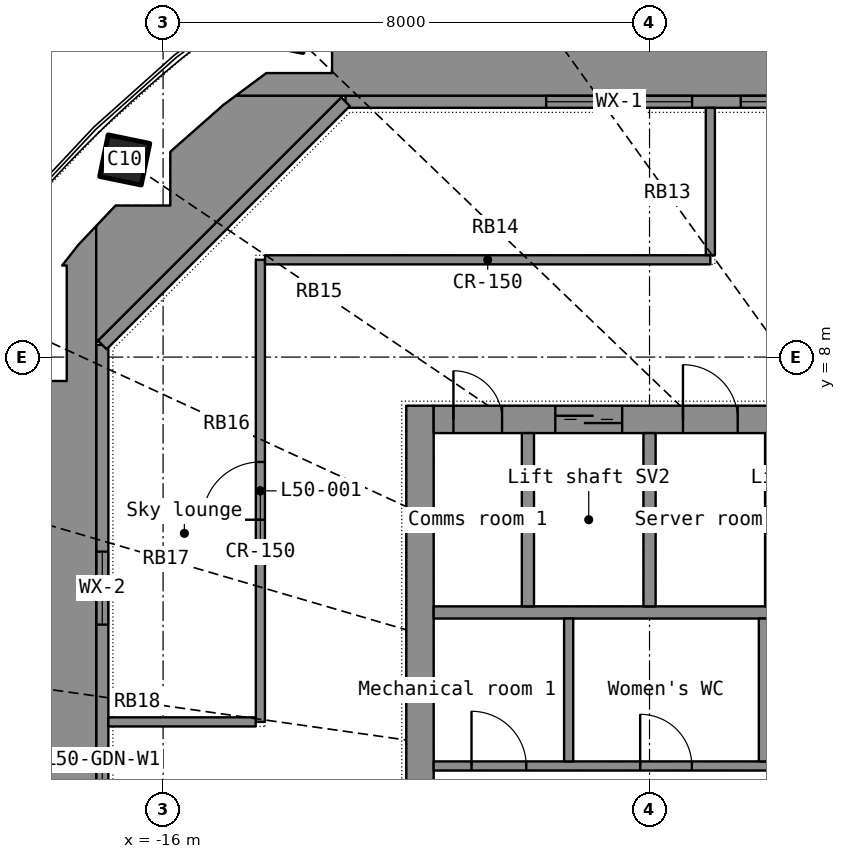
"""IFC4 building model, lengths in metres.
Left out: names, types, materials, properties, quantities, classifications, styles, units other than length and angle.
Written with IfcOpenShell. Run it as: python <this file> out.ifc"""

import sys

from ifc_helpers import new_model, si_unit, direction, frame, frame_2d, origin, origin_2d, place, context, subcontext, project, spatial, polyline, rectangle, hollow_rectangle, outline, extrude, element, fill, save


model = new_model("IFC4")
c1 = context("Model", 3, precision=1e-05, world=origin(), true_north=direction((0.0, 1.0)))
c2 = subcontext(c1, "Body", "Model", "MODEL_VIEW")
j1 = project(units=[si_unit("LENGTHUNIT", "METRE"), si_unit("PLANEANGLEUNIT", "RADIAN")], contexts=[c1])
p1 = place(None, origin())
s1 = spatial("IfcSite", under=j1, at=p1, CompositionType="ELEMENT")
p2 = place(p1, origin())
s2 = spatial("IfcBuilding", under=s1, at=p2, CompositionType="ELEMENT")
p3 = place(p2, frame((0.0, 0.0, 205.2)))
s3 = spatial("IfcBuildingStorey", under=s2, at=p3, CompositionType="ELEMENT", Elevation=205.2)
p4 = place(p3, frame((-13.971, 13.421, 0.0), z_axis=(0.022258382, -0.021697801, 0.999516768), x_axis=(0.828160065, 0.560456529, -0.006275862)))
e1 = element("IfcColumn", 1, at=p4, inside=s3, PredefinedType="COLUMN", context=c2, shape_type="SweptSolid", body=[
    extrude(hollow_rectangle(XDim=0.7, YDim=0.7, WallThickness=0.025, at=origin_2d()), origin(), (0.0, 0.0, 1.0), 7.404),
])
p5 = place(p3, frame((-16.631, 11.243, 0.0), z_axis=(0.026511305, -0.018201791, 0.999482789), x_axis=(0.720516136, 0.693407857, -0.006483911)))
e2 = element("IfcColumn", 2, at=p5, inside=s3, PredefinedType="COLUMN", context=c2, shape_type="SweptSolid", body=[
    extrude(hollow_rectangle(XDim=0.7, YDim=0.7, WallThickness=0.025, at=origin_2d()), origin(), (0.0, 0.0, 1.0), 7.404),
])
p6 = place(p3, frame((-18.535, 8.557, 0.0), z_axis=(0.029972624, -0.014178469, 0.999450155), x_axis=(0.583640912, 0.811989828, -0.005983767)))
e3 = element("IfcColumn", 3, at=p6, inside=s3, PredefinedType="COLUMN", context=c2, shape_type="SweptSolid", body=[
    extrude(hollow_rectangle(XDim=1.1, YDim=1.1, WallThickness=0.032, at=origin_2d()), origin(), (0.0, 0.0, 1.0), 7.404),
])
p7 = place(p3, frame((-13.0, 12.2, 0.08), z_axis=(0.0, 0.0, 1.0), x_axis=(1.0, 0.0, 0.0)))
e4 = element("IfcWall", 4, at=p7, inside=s3, PredefinedType="STANDARD", context=c2, shape_type="SweptSolid", body=[
    extrude(rectangle(XDim=26.0, YDim=0.2, at=frame_2d((13.0, 0.0))), origin(), (0.0, 0.0, 1.0), 7.12),
])
p8 = place(p7, frame((7.1, 0.0, 0.0)))
e5 = element("IfcOpeningElement", 5, at=p8, cuts=e4, PredefinedType="OPENING", context=c2, shape_type="SweptSolid", body=[
    extrude(rectangle(XDim=1.8, YDim=2.4, at=frame_2d((0.9, 1.2))), frame((0.0, 0.11, 0.0), z_axis=(0.0, -1.0, 0.0), x_axis=(1.0, 0.0, 0.0)), (0.0, 0.0, 1.0), 0.22),
])
p9 = place(p7, frame((17.1, 0.0, 0.0)))
e6 = element("IfcOpeningElement", 6, at=p9, cuts=e4, PredefinedType="OPENING", context=c2, shape_type="SweptSolid", body=[
    extrude(rectangle(XDim=1.8, YDim=2.4, at=frame_2d((0.9, 1.2))), frame((0.0, 0.11, 0.0), z_axis=(0.0, -1.0, 0.0), x_axis=(1.0, 0.0, 0.0)), (0.0, 0.0, 1.0), 0.22),
])
p10 = place(p7, frame((3.3, 0.0, 0.9)))
e7 = element("IfcOpeningElement", 7, at=p10, cuts=e4, PredefinedType="OPENING", context=c2, shape_type="SweptSolid", body=[
    extrude(rectangle(XDim=2.4, YDim=1.5, at=frame_2d((1.2, 0.75))), frame((0.0, 0.11, 0.0), z_axis=(0.0, -1.0, 0.0), x_axis=(1.0, 0.0, 0.0)), (0.0, 0.0, 1.0), 0.22),
])
p11 = place(p7, frame((11.8, 0.0, 0.9)))
e8 = element("IfcOpeningElement", 8, at=p11, cuts=e4, PredefinedType="OPENING", context=c2, shape_type="SweptSolid", body=[
    extrude(rectangle(XDim=2.4, YDim=1.5, at=frame_2d((1.2, 0.75))), frame((0.0, 0.11, 0.0), z_axis=(0.0, -1.0, 0.0), x_axis=(1.0, 0.0, 0.0)), (0.0, 0.0, 1.0), 0.22),
])
p12 = place(p7, frame((20.3, 0.0, 0.9)))
e9 = element("IfcOpeningElement", 9, at=p12, cuts=e4, PredefinedType="OPENING", context=c2, shape_type="SweptSolid", body=[
    extrude(rectangle(XDim=2.4, YDim=1.5, at=frame_2d((1.2, 0.75))), frame((0.0, 0.11, 0.0), z_axis=(0.0, -1.0, 0.0), x_axis=(1.0, 0.0, 0.0)), (0.0, 0.0, 1.0), 0.22),
])
p13 = place(p7, frame((6.5, 0.0, 3.2)))
e10 = element("IfcOpeningElement", 10, at=p13, cuts=e4, PredefinedType="OPENING", context=c2, shape_type="SweptSolid", body=[
    extrude(rectangle(XDim=3.0, YDim=1.0, at=frame_2d((1.5, 0.5))), frame((0.0, 0.11, 0.0), z_axis=(0.0, -1.0, 0.0), x_axis=(1.0, 0.0, 0.0)), (0.0, 0.0, 1.0), 0.22),
])
p14 = place(p7, frame((16.5, 0.0, 3.2)))
e11 = element("IfcOpeningElement", 11, at=p14, cuts=e4, PredefinedType="OPENING", context=c2, shape_type="SweptSolid", body=[
    extrude(rectangle(XDim=3.0, YDim=1.0, at=frame_2d((1.5, 0.5))), frame((0.0, 0.11, 0.0), z_axis=(0.0, -1.0, 0.0), x_axis=(1.0, 0.0, 0.0)), (0.0, 0.0, 1.0), 0.22),
])
p15 = place(p3, frame((-17.0, -8.2, 0.08), z_axis=(0.0, 0.0, 1.0), x_axis=(0.0, 1.0, 0.0)))
e12 = element("IfcWall", 12, at=p15, inside=s3, PredefinedType="STANDARD", context=c2, shape_type="SweptSolid", body=[
    extrude(rectangle(XDim=16.4, YDim=0.2, at=frame_2d((8.2, 0.0))), origin(), (0.0, 0.0, 1.0), 7.12),
])
p16 = place(p15, frame((7.3, 0.0, 0.0)))
e13 = element("IfcOpeningElement", 13, at=p16, cuts=e12, PredefinedType="OPENING", context=c2, shape_type="SweptSolid", body=[
    extrude(rectangle(XDim=1.8, YDim=2.4, at=frame_2d((0.9, 1.2))), frame((0.0, 0.11, 0.0), z_axis=(0.0, -1.0, 0.0), x_axis=(1.0, 0.0, 0.0)), (0.0, 0.0, 1.0), 0.22),
])
p17 = place(p15, frame((3.4, 0.0, 0.1)))
e14 = element("IfcOpeningElement", 14, at=p17, cuts=e12, PredefinedType="OPENING", context=c2, shape_type="SweptSolid", body=[
    extrude(rectangle(XDim=1.2, YDim=2.2, at=frame_2d((0.6, 1.1))), frame((0.0, 0.11, 0.0), z_axis=(0.0, -1.0, 0.0), x_axis=(1.0, 0.0, 0.0)), (0.0, 0.0, 1.0), 0.22),
])
p18 = place(p15, frame((11.8, 0.0, 0.1)))
e15 = element("IfcOpeningElement", 15, at=p18, cuts=e12, PredefinedType="OPENING", context=c2, shape_type="SweptSolid", body=[
    extrude(rectangle(XDim=1.2, YDim=2.2, at=frame_2d((0.6, 1.1))), frame((0.0, 0.11, 0.0), z_axis=(0.0, -1.0, 0.0), x_axis=(1.0, 0.0, 0.0)), (0.0, 0.0, 1.0), 0.22),
])
p19 = place(p3, frame((-17.0, 8.2, 0.08), z_axis=(0.0, 0.0, 1.0), x_axis=(0.707106781, 0.707106781, 0.0)))
e16 = element("IfcWall", 16, at=p19, inside=s3, PredefinedType="STANDARD", context=c2, shape_type="SweptSolid", body=[
    extrude(rectangle(XDim=5.657, YDim=0.2, at=frame_2d((2.828, 0.0))), origin(), (0.0, 0.0, 1.0), 7.12),
])
p20 = place(p3, frame((0.0, 0.0, -0.4)))
e17 = element("IfcWall", 17, at=p20, inside=s3, PredefinedType="ELEMENTEDWALL", context=c2, shape_type="SweptSolid", body=[
    extrude(outline(polyline([(-21.019, 2.273), (-21.145, 1.497), (-21.175, 0.95), (-20.39, 0.95), (-20.39, 0.9), (-17.1, 0.9), (-17.1, 8.241), (-17.1, 10.156), (-17.387, 9.853), (-17.66, 9.507), (-17.585, 9.507), (-17.585, 7.607), (-19.014, 7.607), (-19.237, 7.26), (-19.606, 6.54), (-19.606, 5.212), (-20.205, 5.212), (-20.503, 4.446), (-20.687, 3.773), (-20.567, 3.773), (-20.567, 2.273), (-21.019, 2.273)])), origin(), (0.0, 0.0, 1.0), 1.58),
])
p21 = place(p3, frame((0.0, 0.0, -0.4)))
e18 = element("IfcWall", 18, at=p21, inside=s3, PredefinedType="ELEMENTEDWALL", context=c2, shape_type="SweptSolid", body=[
    extrude(outline(polyline([(-17.1, 10.156), (-17.1, 8.241), (-13.042, 12.3), (-14.803, 12.3), (-15.009, 12.147), (-15.881, 11.377), (-15.881, 10.493), (-16.781, 10.493), (-17.1, 10.156)])), origin(), (0.0, 0.0, 1.0), 1.58),
])
p22 = place(p3, frame((0.0, 0.0, -0.4)))
e19 = element("IfcWall", 19, at=p22, inside=s3, PredefinedType="ELEMENTEDWALL", context=c2, shape_type="SweptSolid", body=[
    extrude(outline(polyline([(-14.803, 12.3), (-13.042, 12.3), (-5.9, 12.3), (-5.9, 16.49), (-6.696, 16.286), (-6.696, 15.756), (-8.196, 15.756), (-8.196, 15.829), (-8.97, 15.569), (-9.8, 15.22), (-9.8, 13.974), (-11.7, 13.974), (-11.7, 14.317), (-12.175, 14.072), (-13.221, 13.422), (-13.221, 12.671), (-14.302, 12.671), (-14.803, 12.3)])), origin(), (0.0, 0.0, 1.0), 1.58),
])
p23 = place(p3, frame((-11.775, -7.2, 0.0), z_axis=(0.0, 0.0, 1.0), x_axis=(0.0, 1.0, 0.0)))
e20 = element("IfcWall", 20, at=p23, inside=s3, PredefinedType="SHEAR", context=c2, shape_type="SweptSolid", body=[
    extrude(rectangle(XDim=14.4, YDim=0.45, at=frame_2d((7.2, 0.0))), origin(), (0.0, 0.0, 1.0), 7.0),
])
p24 = place(p23, frame((6.5, 0.0, 0.0)))
e21 = element("IfcOpeningElement", 21, at=p24, cuts=e20, PredefinedType="OPENING", context=c2, shape_type="SweptSolid", body=[
    extrude(rectangle(XDim=1.4, YDim=2.2, at=frame_2d((0.7, 1.1))), frame((0.0, 0.235, 0.0), z_axis=(0.0, -1.0, 0.0), x_axis=(1.0, 0.0, 0.0)), (0.0, 0.0, 1.0), 0.47),
])
p25 = place(p3, frame((-11.55, 6.975, 0.0), z_axis=(0.0, 0.0, 1.0), x_axis=(1.0, 0.0, 0.0)))
e22 = element("IfcWall", 22, at=p25, inside=s3, PredefinedType="SHEAR", context=c2, shape_type="SweptSolid", body=[
    extrude(rectangle(XDim=23.1, YDim=0.45, at=frame_2d((11.55, 0.0))), origin(), (0.0, 0.0, 1.0), 7.0),
])
p26 = place(p25, frame((2.0, 0.0, 0.0)))
e23 = element("IfcOpeningElement", 23, at=p26, cuts=e22, PredefinedType="OPENING", context=c2, shape_type="SweptSolid", body=[
    extrude(rectangle(XDim=1.1, YDim=2.2, at=frame_2d((0.55, 1.1))), frame((0.0, 0.235, 0.0), z_axis=(0.0, -1.0, 0.0), x_axis=(1.0, 0.0, 0.0)), (0.0, 0.0, 1.0), 0.47),
])
p27 = place(p25, frame((6.0, 0.0, 0.0)))
e24 = element("IfcOpeningElement", 24, at=p27, cuts=e22, PredefinedType="OPENING", context=c2, shape_type="SweptSolid", body=[
    extrude(rectangle(XDim=1.1, YDim=2.2, at=frame_2d((0.55, 1.1))), frame((0.0, 0.235, 0.0), z_axis=(0.0, -1.0, 0.0), x_axis=(1.0, 0.0, 0.0)), (0.0, 0.0, 1.0), 0.47),
])
p28 = place(p25, frame((8.0, 0.0, 0.0)))
e25 = element("IfcOpeningElement", 25, at=p28, cuts=e22, PredefinedType="OPENING", context=c2, shape_type="SweptSolid", body=[
    extrude(rectangle(XDim=1.1, YDim=2.2, at=frame_2d((0.55, 1.1))), frame((0.0, 0.235, 0.0), z_axis=(0.0, -1.0, 0.0), x_axis=(1.0, 0.0, 0.0)), (0.0, 0.0, 1.0), 0.47),
])
p29 = place(p25, frame((10.0, 0.0, 0.0)))
e26 = element("IfcOpeningElement", 26, at=p29, cuts=e22, PredefinedType="OPENING", context=c2, shape_type="SweptSolid", body=[
    extrude(rectangle(XDim=1.1, YDim=2.2, at=frame_2d((0.55, 1.1))), frame((0.0, 0.235, 0.0), z_axis=(0.0, -1.0, 0.0), x_axis=(1.0, 0.0, 0.0)), (0.0, 0.0, 1.0), 0.47),
])
p30 = place(p25, frame((12.0, 0.0, 0.0)))
e27 = element("IfcOpeningElement", 27, at=p30, cuts=e22, PredefinedType="OPENING", context=c2, shape_type="SweptSolid", body=[
    extrude(rectangle(XDim=1.1, YDim=2.2, at=frame_2d((0.55, 1.1))), frame((0.0, 0.235, 0.0), z_axis=(0.0, -1.0, 0.0), x_axis=(1.0, 0.0, 0.0)), (0.0, 0.0, 1.0), 0.47),
])
p31 = place(p25, frame((14.0, 0.0, 0.0)))
e28 = element("IfcOpeningElement", 28, at=p31, cuts=e22, PredefinedType="OPENING", context=c2, shape_type="SweptSolid", body=[
    extrude(rectangle(XDim=1.1, YDim=2.2, at=frame_2d((0.55, 1.1))), frame((0.0, 0.235, 0.0), z_axis=(0.0, -1.0, 0.0), x_axis=(1.0, 0.0, 0.0)), (0.0, 0.0, 1.0), 0.47),
])
p32 = place(p25, frame((16.0, 0.0, 0.0)))
e29 = element("IfcOpeningElement", 29, at=p32, cuts=e22, PredefinedType="OPENING", context=c2, shape_type="SweptSolid", body=[
    extrude(rectangle(XDim=1.1, YDim=2.2, at=frame_2d((0.55, 1.1))), frame((0.0, 0.235, 0.0), z_axis=(0.0, -1.0, 0.0), x_axis=(1.0, 0.0, 0.0)), (0.0, 0.0, 1.0), 0.47),
])
p33 = place(p25, frame((18.0, 0.0, 0.0)))
e30 = element("IfcOpeningElement", 30, at=p33, cuts=e22, PredefinedType="OPENING", context=c2, shape_type="SweptSolid", body=[
    extrude(rectangle(XDim=1.1, YDim=2.2, at=frame_2d((0.55, 1.1))), frame((0.0, 0.235, 0.0), z_axis=(0.0, -1.0, 0.0), x_axis=(1.0, 0.0, 0.0)), (0.0, 0.0, 1.0), 0.47),
])
p34 = place(p25, frame((20.0, 0.0, 0.0)))
e31 = element("IfcOpeningElement", 31, at=p34, cuts=e22, PredefinedType="OPENING", context=c2, shape_type="SweptSolid", body=[
    extrude(rectangle(XDim=1.1, YDim=2.2, at=frame_2d((0.55, 1.1))), frame((0.0, 0.235, 0.0), z_axis=(0.0, -1.0, 0.0), x_axis=(1.0, 0.0, 0.0)), (0.0, 0.0, 1.0), 0.47),
])
p35 = place(p25, frame((4.1, 0.0, 0.0)))
e32 = element("IfcOpeningElement", 32, at=p35, cuts=e22, PredefinedType="OPENING", context=c2, shape_type="SweptSolid", body=[
    extrude(rectangle(XDim=0.9, YDim=2.1, at=frame_2d((0.45, 1.05))), frame((0.0, 0.235, 0.0), z_axis=(0.0, -1.0, 0.0), x_axis=(1.0, 0.0, 0.0)), (0.0, 0.0, 1.0), 0.47),
])
p36 = place(p25, frame((0.325, 0.0, 0.0)))
e33 = element("IfcOpeningElement", 33, at=p36, cuts=e22, PredefinedType="OPENING", context=c2, shape_type="SweptSolid", body=[
    extrude(rectangle(XDim=0.8, YDim=2.05, at=frame_2d((0.4, 1.025))), frame((0.0, 0.235, 0.0), z_axis=(0.0, -1.0, 0.0), x_axis=(1.0, 0.0, 0.0)), (0.0, 0.0, 1.0), 0.47),
])
p37 = place(p25, frame((21.975, 0.0, 0.0)))
e34 = element("IfcOpeningElement", 34, at=p37, cuts=e22, PredefinedType="OPENING", context=c2, shape_type="SweptSolid", body=[
    extrude(rectangle(XDim=0.8, YDim=2.05, at=frame_2d((0.4, 1.025))), frame((0.0, 0.235, 0.0), z_axis=(0.0, -1.0, 0.0), x_axis=(1.0, 0.0, 0.0)), (0.0, 0.0, 1.0), 0.47),
])
p38 = place(p3, frame((-11.55, 3.8, 0.0), z_axis=(0.0, 0.0, 1.0), x_axis=(1.0, 0.0, 0.0)))
e35 = element("IfcWall", 35, at=p38, inside=s3, PredefinedType="SHEAR", context=c2, shape_type="SweptSolid", body=[
    extrude(rectangle(XDim=23.1, YDim=0.2, at=frame_2d((11.55, 0.0))), origin(), (0.0, 0.0, 1.0), 7.0),
])
for number, where, z_axis, x_axis in (
    (36, (-10.0, 3.9, 0.0), (0.0, 0.0, 1.0), (0.0, 1.0, 0.0)),
    (37, (-8.0, 3.9, 0.0), (0.0, 0.0, 1.0), (0.0, 1.0, 0.0)),
    (38, (-6.0, 3.9, 0.0), (0.0, 0.0, 1.0), (0.0, 1.0, 0.0)),
):
    element("IfcWall", number, at=place(p3, frame(where, z_axis=z_axis, x_axis=x_axis)), inside=s3, PredefinedType="SHEAR", context=c2, shape_type="SweptSolid", body=[
        extrude(rectangle(XDim=2.85, YDim=0.2, at=frame_2d((1.425, 0.0))), origin(), (0.0, 0.0, 1.0), 7.0),
    ])
p39 = place(p3, frame((-11.55, 1.275, 0.0), z_axis=(0.0, 0.0, 1.0), x_axis=(1.0, 0.0, 0.0)))
e39 = element("IfcWall", 39, at=p39, inside=s3, PredefinedType="PARTITIONING", context=c2, shape_type="SweptSolid", body=[
    extrude(rectangle(XDim=8.55, YDim=0.15, at=frame_2d((4.275, 0.0))), origin(), (0.0, 0.0, 1.0), 7.0),
])
p40 = place(p39, frame((0.623, 0.0, 0.0)))
e40 = element("IfcOpeningElement", 40, at=p40, cuts=e39, PredefinedType="OPENING", context=c2, shape_type="SweptSolid", body=[
    extrude(rectangle(XDim=0.9, YDim=2.1, at=frame_2d((0.45, 1.05))), frame((0.0, 0.085, 0.0), z_axis=(0.0, -1.0, 0.0), x_axis=(1.0, 0.0, 0.0)), (0.0, 0.0, 1.0), 0.17),
])
p41 = place(p39, frame((3.396, 0.0, 0.0)))
e41 = element("IfcOpeningElement", 41, at=p41, cuts=e39, PredefinedType="OPENING", context=c2, shape_type="SweptSolid", body=[
    extrude(rectangle(XDim=0.85, YDim=2.1, at=frame_2d((0.425, 1.05))), frame((0.0, 0.085, 0.0), z_axis=(0.0, -1.0, 0.0), x_axis=(1.0, 0.0, 0.0)), (0.0, 0.0, 1.0), 0.17),
])
p42 = place(p39, frame((6.599, 0.0, 0.0)))
e42 = element("IfcOpeningElement", 42, at=p42, cuts=e39, PredefinedType="OPENING", context=c2, shape_type="SweptSolid", body=[
    extrude(rectangle(XDim=0.85, YDim=2.1, at=frame_2d((0.425, 1.05))), frame((0.0, 0.085, 0.0), z_axis=(0.0, -1.0, 0.0), x_axis=(1.0, 0.0, 0.0)), (0.0, 0.0, 1.0), 0.17),
])
for number, where, z_axis, x_axis in (
    (43, (-9.33, 1.35, 0.0), (0.0, 0.0, 1.0), (0.0, 1.0, 0.0)),
    (44, (-6.127, 1.35, 0.0), (0.0, 0.0, 1.0), (0.0, 1.0, 0.0)),
):
    element("IfcWall", number, at=place(p3, frame(where, z_axis=z_axis, x_axis=x_axis)), inside=s3, PredefinedType="PARTITIONING", context=c2, shape_type="SweptSolid", body=[
        extrude(rectangle(XDim=2.35, YDim=0.15, at=frame_2d((1.175, 0.0))), origin(), (0.0, 0.0, 1.0), 7.0),
    ])
p43 = place(p3, frame((-14.4, 2.0, 0.0), z_axis=(0.0, 0.0, 1.0), x_axis=(0.0, 1.0, 0.0)))
e45 = element("IfcWall", 45, at=p43, inside=s3, PredefinedType="PARTITIONING", context=c2, shape_type="SweptSolid", body=[
    extrude(rectangle(XDim=7.6, YDim=0.15, at=frame_2d((3.8, 0.0))), origin(), (0.0, 0.0, 1.0), 6.1),
])
p44 = place(p43, frame((3.325, 0.0, 0.0)))
e46 = element("IfcOpeningElement", 46, at=p44, cuts=e45, PredefinedType="OPENING", context=c2, shape_type="SweptSolid", body=[
    extrude(rectangle(XDim=0.95, YDim=2.15, at=frame_2d((0.475, 1.075))), frame((0.0, 0.085, 0.0), z_axis=(0.0, -1.0, 0.0), x_axis=(1.0, 0.0, 0.0)), (0.0, 0.0, 1.0), 0.17),
])
p45 = place(p3, frame((-14.323, 9.6, 0.0), z_axis=(0.0, 0.0, 1.0), x_axis=(1.0, 0.0, 0.0)))
e47 = element("IfcWall", 47, at=p45, inside=s3, PredefinedType="PARTITIONING", context=c2, shape_type="SweptSolid", body=[
    extrude(rectangle(XDim=7.323, YDim=0.15, at=frame_2d((3.662, 0.0))), origin(), (0.0, 0.0, 1.0), 6.1),
])
p46 = place(p3, frame((-7.0, 9.677, 0.0), z_axis=(0.0, 0.0, 1.0), x_axis=(0.0, 1.0, 0.0)))
e48 = element("IfcWall", 48, at=p46, inside=s3, PredefinedType="PARTITIONING", context=c2, shape_type="SweptSolid", body=[
    extrude(rectangle(XDim=2.423, YDim=0.15, at=frame_2d((1.211, 0.0))), origin(), (0.0, 0.0, 1.0), 6.1),
])
p47 = place(p3, frame((-16.9, 2.0, 0.0), z_axis=(0.0, 0.0, 1.0), x_axis=(1.0, 0.0, 0.0)))
e49 = element("IfcWall", 49, at=p47, inside=s3, PredefinedType="PARTITIONING", context=c2, shape_type="SweptSolid", body=[
    extrude(rectangle(XDim=2.423, YDim=0.15, at=frame_2d((1.211, 0.0))), origin(), (0.0, 0.0, 1.0), 6.1),
])
p48 = place(p10, origin())
e50 = element("IfcWindow", 50, at=p48, inside=s3, PartitioningType="SINGLE_PANEL", PredefinedType="WINDOW", context=c2, shape_type="SweptSolid", body=[
    extrude(rectangle(XDim=2.4, YDim=1.5, at=frame_2d((1.2, 0.75))), frame((0.0, 0.03, 0.0), z_axis=(0.0, -1.0, 0.0), x_axis=(1.0, 0.0, 0.0)), (0.0, 0.0, 1.0), 0.06),
])
fill(e7, e50)
p49 = place(p13, origin())
e51 = element("IfcWindow", 51, at=p49, inside=s3, PartitioningType="SINGLE_PANEL", PredefinedType="WINDOW", context=c2, shape_type="SweptSolid", body=[
    extrude(rectangle(XDim=3.0, YDim=1.0, at=frame_2d((1.5, 0.5))), frame((0.0, 0.03, 0.0), z_axis=(0.0, -1.0, 0.0), x_axis=(1.0, 0.0, 0.0)), (0.0, 0.0, 1.0), 0.06),
])
fill(e10, e51)
p50 = place(p18, origin())
e52 = element("IfcWindow", 52, at=p50, inside=s3, PartitioningType="SINGLE_PANEL", PredefinedType="WINDOW", context=c2, shape_type="SweptSolid", body=[
    extrude(rectangle(XDim=1.2, YDim=2.2, at=frame_2d((0.6, 1.1))), frame((0.0, 0.03, 0.0), z_axis=(0.0, -1.0, 0.0), x_axis=(1.0, 0.0, 0.0)), (0.0, 0.0, 1.0), 0.06),
])
fill(e15, e52)
p51 = place(p26, origin())
e53 = element("IfcDoor", 53, at=p51, inside=s3, OperationType="DOUBLE_DOOR_SLIDING", PredefinedType="DOOR", context=c2, shape_type="SweptSolid", body=[
    extrude(rectangle(XDim=1.1, YDim=2.2, at=frame_2d((0.55, 1.1))), frame((0.0, 0.025, 0.0), z_axis=(0.0, -1.0, 0.0), x_axis=(1.0, 0.0, 0.0)), (0.0, 0.0, 1.0), 0.05),
])
fill(e23, e53)
p52 = place(p35, origin())
e54 = element("IfcDoor", 54, at=p52, inside=s3, OperationType="SINGLE_SWING_LEFT", PredefinedType="DOOR", context=c2, shape_type="SweptSolid", body=[
    extrude(rectangle(XDim=0.9, YDim=2.1, at=frame_2d((0.45, 1.05))), frame((0.0, 0.025, 0.0), z_axis=(0.0, -1.0, 0.0), x_axis=(1.0, 0.0, 0.0)), (0.0, 0.0, 1.0), 0.05),
])
fill(e32, e54)
p53 = place(p36, origin())
e55 = element("IfcDoor", 55, at=p53, inside=s3, OperationType="SINGLE_SWING_LEFT", PredefinedType="DOOR", context=c2, shape_type="SweptSolid", body=[
    extrude(rectangle(XDim=0.8, YDim=2.05, at=frame_2d((0.4, 1.025))), frame((0.0, 0.025, 0.0), z_axis=(0.0, -1.0, 0.0), x_axis=(1.0, 0.0, 0.0)), (0.0, 0.0, 1.0), 0.05),
])
fill(e33, e55)
p54 = place(p40, origin())
e56 = element("IfcDoor", 56, at=p54, inside=s3, OperationType="SINGLE_SWING_LEFT", PredefinedType="DOOR", context=c2, shape_type="SweptSolid", body=[
    extrude(rectangle(XDim=0.9, YDim=2.1, at=frame_2d((0.45, 1.05))), frame((0.0, 0.025, 0.0), z_axis=(0.0, -1.0, 0.0), x_axis=(1.0, 0.0, 0.0)), (0.0, 0.0, 1.0), 0.05),
])
fill(e40, e56)
p55 = place(p41, origin())
e57 = element("IfcDoor", 57, at=p55, inside=s3, OperationType="SINGLE_SWING_LEFT", PredefinedType="DOOR", context=c2, shape_type="SweptSolid", body=[
    extrude(rectangle(XDim=0.85, YDim=2.1, at=frame_2d((0.425, 1.05))), frame((0.0, 0.025, 0.0), z_axis=(0.0, -1.0, 0.0), x_axis=(1.0, 0.0, 0.0)), (0.0, 0.0, 1.0), 0.05),
])
fill(e41, e57)
p56 = place(p44, origin())
e58 = element("IfcDoor", 58, at=p56, inside=s3, OperationType="SINGLE_SWING_LEFT", PredefinedType="DOOR", context=c2, shape_type="SweptSolid", body=[
    extrude(rectangle(XDim=0.95, YDim=2.15, at=frame_2d((0.475, 1.075))), frame((0.0, 0.025, 0.0), z_axis=(0.0, -1.0, 0.0), x_axis=(1.0, 0.0, 0.0)), (0.0, 0.0, 1.0), 0.05),
])
fill(e46, e58)
save(model, sys.argv[1])
